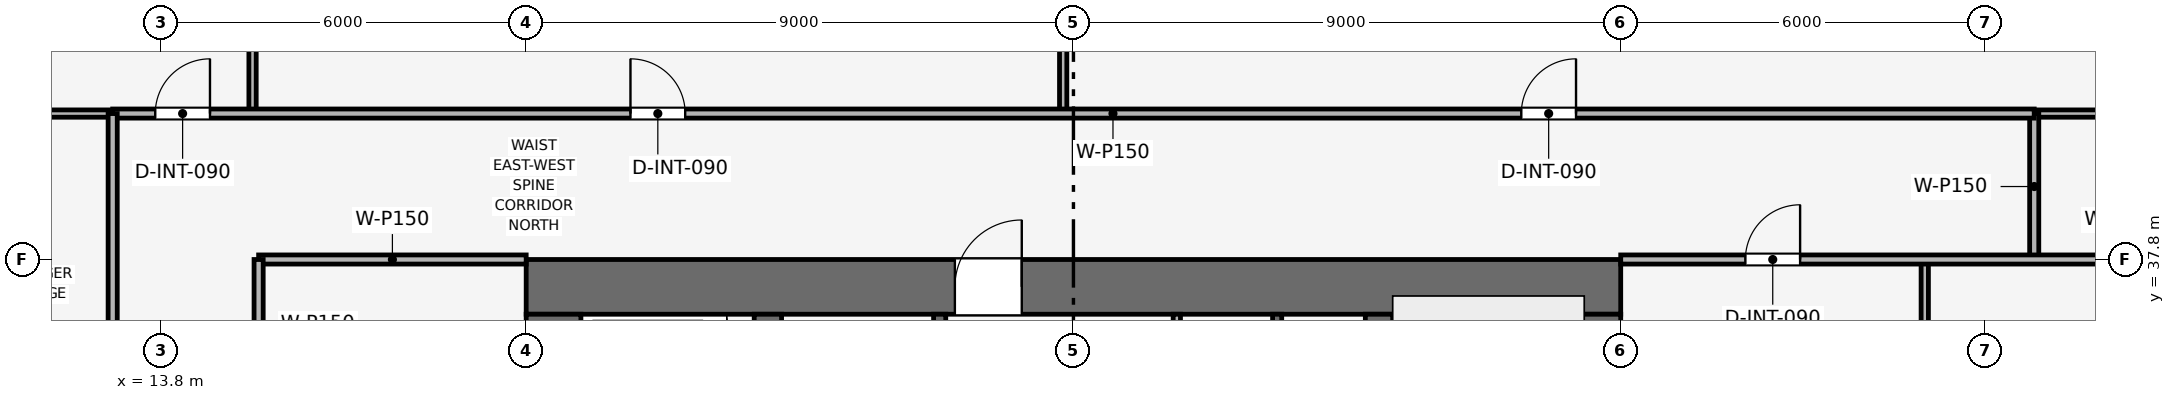
"""IFC4 building model, lengths in metres.
Left out: names, types, materials, properties, quantities, classifications, styles, units other than length and angle.
Written with IfcOpenShell. Run it as: python <this file> out.ifc"""

import sys

from ifc_helpers import new_model, si_unit, direction, frame, frame_2d, origin, place, context, subcontext, project, spatial, rectangle, extrude, element, fill, save


model = new_model("IFC4")
c1 = context("Model", 3, precision=1e-05, world=origin(), true_north=direction((0.0, 1.0)))
c2 = subcontext(c1, "Body", "Model", "MODEL_VIEW")
j1 = project(units=[si_unit("LENGTHUNIT", "METRE"), si_unit("PLANEANGLEUNIT", "RADIAN")], contexts=[c1])
p1 = place(None, origin())
s1 = spatial("IfcSite", under=j1, at=p1, CompositionType="ELEMENT")
p2 = place(p1, origin())
s2 = spatial("IfcBuilding", under=s1, at=p2, CompositionType="ELEMENT")
p3 = place(p2, frame((0.0, 0.0, 172.05)))
s3 = spatial("IfcBuildingStorey", under=s2, at=p3, CompositionType="ELEMENT", Elevation=172.05)
p4 = place(p3, frame((19.8, 37.35, 0.0), z_axis=(0.0, 0.0, 1.0), x_axis=(1.0, 0.0, 0.0)))
e1 = element("IfcWall", 1, at=p4, inside=s3, PredefinedType="SHEAR", context=c2, shape_type="SweptSolid", body=[
    extrude(rectangle(XDim=18.0, YDim=0.9, at=frame_2d((9.0, 0.0))), origin(), (0.0, 0.0, 1.0), 3.75),
])
p5 = place(p4, frame((7.05, 0.0, 0.0)))
e2 = element("IfcOpeningElement", 2, at=p5, cuts=e1, PredefinedType="OPENING", context=c2, shape_type="SweptSolid", body=[
    extrude(rectangle(XDim=1.1, YDim=2.15, at=frame_2d((0.55, 1.075))), frame((0.0, 0.46, 0.0), z_axis=(0.0, -1.0, 0.0), x_axis=(1.0, 0.0, 0.0)), (0.0, 0.0, 1.0), 0.92),
])
p6 = place(p3, frame((20.25, 20.7, 0.0), z_axis=(0.0, 0.0, 1.0), x_axis=(0.0, 1.0, 0.0)))
e3 = element("IfcWall", 3, at=p6, inside=s3, PredefinedType="SHEAR", context=c2, shape_type="SweptSolid", body=[
    extrude(rectangle(XDim=16.2, YDim=0.9, at=frame_2d((8.1, 0.0))), origin(), (0.0, 0.0, 1.0), 3.75),
])
p7 = place(p6, frame((10.1, 0.0, 0.0)))
e4 = element("IfcOpeningElement", 4, at=p7, cuts=e3, PredefinedType="OPENING", context=c2, shape_type="SweptSolid", body=[
    extrude(rectangle(XDim=1.1, YDim=2.15, at=frame_2d((0.55, 1.075))), frame((0.0, 0.46, 0.0), z_axis=(0.0, -1.0, 0.0), x_axis=(1.0, 0.0, 0.0)), (0.0, 0.0, 1.0), 0.92),
])
p8 = place(p3, frame((37.35, 20.7, 0.0), z_axis=(0.0, 0.0, 1.0), x_axis=(0.0, 1.0, 0.0)))
e5 = element("IfcWall", 5, at=p8, inside=s3, PredefinedType="SHEAR", context=c2, shape_type="SweptSolid", body=[
    extrude(rectangle(XDim=16.2, YDim=0.9, at=frame_2d((8.1, 0.0))), origin(), (0.0, 0.0, 1.0), 3.75),
])
p9 = place(p8, frame((4.6, 0.0, 0.0)))
e6 = element("IfcOpeningElement", 6, at=p9, cuts=e5, PredefinedType="OPENING", context=c2, shape_type="SweptSolid", body=[
    extrude(rectangle(XDim=1.1, YDim=2.15, at=frame_2d((0.55, 1.075))), frame((0.0, 0.46, 0.0), z_axis=(0.0, -1.0, 0.0), x_axis=(1.0, 0.0, 0.0)), (0.0, 0.0, 1.0), 0.92),
])
for number, where, z_axis, x_axis in (
    (7, (23.775, 20.7, 0.0), (0.0, 0.0, 1.0), (0.0, 1.0, 0.0)),
    (8, (33.825, 20.7, 0.0), (0.0, 0.0, 1.0), (0.0, 1.0, 0.0)),
):
    element("IfcWall", number, at=place(p3, frame(where, z_axis=z_axis, x_axis=x_axis)), inside=s3, PredefinedType="SHEAR", context=c2, shape_type="SweptSolid", body=[
        extrude(rectangle(XDim=16.2, YDim=0.45, at=frame_2d((8.1, 0.0))), origin(), (0.0, 0.0, 1.0), 3.75),
    ])
p10 = place(p3, frame((32.15, 34.0, 0.0), z_axis=(0.0, 0.0, 1.0), x_axis=(0.0, 1.0, 0.0)))
e9 = element("IfcWall", 9, at=p10, inside=s3, PredefinedType="SHEAR", context=c2, shape_type="SweptSolid", body=[
    extrude(rectangle(XDim=2.9, YDim=0.15, at=frame_2d((1.45, 0.0))), origin(), (0.0, 0.0, 1.0), 3.495),
])
p11 = place(p3, frame((26.6, 34.0, 0.0), z_axis=(0.0, 0.0, 1.0), x_axis=(0.0, 1.0, 0.0)))
e10 = element("IfcWall", 10, at=p11, inside=s3, PredefinedType="SHEAR", context=c2, shape_type="SweptSolid", body=[
    extrude(rectangle(XDim=2.9, YDim=0.2, at=frame_2d((1.45, 0.0))), origin(), (0.0, 0.0, 1.0), 3.495),
])
p12 = place(p11, frame((0.75, 0.0, 0.0)))
e11 = element("IfcOpeningElement", 11, at=p12, cuts=e10, PredefinedType="OPENING", context=c2, shape_type="SweptSolid", body=[
    extrude(rectangle(XDim=1.1, YDim=2.15, at=frame_2d((0.55, 1.075))), frame((0.0, 0.11, 0.0), z_axis=(0.0, -1.0, 0.0), x_axis=(1.0, 0.0, 0.0)), (0.0, 0.0, 1.0), 0.22),
])
p13 = place(p3, frame((30.5, 33.925, 0.0), z_axis=(0.0, 0.0, 1.0), x_axis=(0.0, 1.0, 0.0)))
e12 = element("IfcWall", 12, at=p13, inside=s3, PredefinedType="PARTITIONING", context=c2, shape_type="SweptSolid", body=[
    extrude(rectangle(XDim=2.975, YDim=0.12, at=frame_2d((1.487, 0.0))), origin(), (0.0, 0.0, 1.0), 3.495),
])
p14 = place(p13, frame((0.85, 0.0, 0.0)))
e13 = element("IfcOpeningElement", 13, at=p14, cuts=e12, PredefinedType="OPENING", context=c2, shape_type="SweptSolid", body=[
    extrude(rectangle(XDim=0.9, YDim=2.1, at=frame_2d((0.45, 1.05))), frame((0.0, 0.07, 0.0), z_axis=(0.0, -1.0, 0.0), x_axis=(1.0, 0.0, 0.0)), (0.0, 0.0, 1.0), 0.14),
])
p15 = place(p3, frame((15.4, 37.8, 0.0), z_axis=(0.0, 0.0, 1.0), x_axis=(1.0, 0.0, 0.0)))
e14 = element("IfcWall", 14, at=p15, inside=s3, PredefinedType="PARTITIONING", context=c2, shape_type="SweptSolid", body=[
    extrude(rectangle(XDim=4.4, YDim=0.15, at=frame_2d((2.2, 0.0))), origin(), (0.0, 0.0, 1.0), 3.03),
])
p16 = place(p3, frame((15.4, 32.45, 0.0), z_axis=(0.0, 0.0, 1.0), x_axis=(0.0, 1.0, 0.0)))
e15 = element("IfcWall", 15, at=p16, inside=s3, PredefinedType="PARTITIONING", context=c2, shape_type="SweptSolid", body=[
    extrude(rectangle(XDim=5.35, YDim=0.15, at=frame_2d((2.675, 0.0))), origin(), (0.0, 0.0, 1.0), 3.03),
])
p17 = place(p16, frame((2.1, 0.0, 0.0)))
e16 = element("IfcOpeningElement", 16, at=p17, cuts=e15, PredefinedType="OPENING", context=c2, shape_type="SweptSolid", body=[
    extrude(rectangle(XDim=0.9, YDim=2.1, at=frame_2d((0.45, 1.05))), frame((0.0, 0.085, 0.0), z_axis=(0.0, -1.0, 0.0), x_axis=(1.0, 0.0, 0.0)), (0.0, 0.0, 1.0), 0.17),
])
for number, where, z_axis, x_axis in (
    (17, (15.3, 40.2, 0.0), (0.0, 0.0, 1.0), (0.0, 1.0, 0.0)),
    (18, (28.631, 40.2, 0.0), (0.0, 0.0, 1.0), (0.0, 1.0, 0.0)),
):
    element("IfcWall", number, at=place(p3, frame(where, z_axis=z_axis, x_axis=x_axis)), inside=s3, PredefinedType="PARTITIONING", context=c2, shape_type="SweptSolid", body=[
        extrude(rectangle(XDim=12.77, YDim=0.12, at=frame_2d((6.385, 0.0))), origin(), (0.0, 0.0, 1.0), 2.98),
    ])
p18 = place(p3, frame((42.8, 26.85, 0.0), z_axis=(0.0, 0.0, 1.0), x_axis=(0.0, 1.0, 0.0)))
e19 = element("IfcWall", 19, at=p18, inside=s3, PredefinedType="PARTITIONING", context=c2, shape_type="SweptSolid", body=[
    extrude(rectangle(XDim=10.95, YDim=0.12, at=frame_2d((5.475, 0.0))), origin(), (0.0, 0.0, 1.0), 3.03),
])
p19 = place(p18, frame((5.025, 0.0, 0.0)))
e20 = element("IfcOpeningElement", 20, at=p19, cuts=e19, PredefinedType="OPENING", context=c2, shape_type="SweptSolid", body=[
    extrude(rectangle(XDim=0.9, YDim=2.1, at=frame_2d((0.45, 1.05))), frame((0.0, 0.07, 0.0), z_axis=(0.0, -1.0, 0.0), x_axis=(1.0, 0.0, 0.0)), (0.0, 0.0, 1.0), 0.14),
])
p20 = place(p3, frame((4.63, 40.2, 0.0), z_axis=(0.0, 0.0, 1.0), x_axis=(1.0, 0.0, 0.0)))
e21 = element("IfcWall", 21, at=p20, inside=s3, PredefinedType="PARTITIONING", context=c2, shape_type="SweptSolid", body=[
    extrude(rectangle(XDim=8.37, YDim=0.12, at=frame_2d((4.185, 0.0))), origin(), (0.0, 0.0, 1.0), 2.98),
])
p21 = place(p3, frame((44.6, 40.2, 0.0), z_axis=(0.0, 0.0, 1.0), x_axis=(1.0, 0.0, 0.0)))
e22 = element("IfcWall", 22, at=p21, inside=s3, PredefinedType="PARTITIONING", context=c2, shape_type="SweptSolid", body=[
    extrude(rectangle(XDim=8.37, YDim=0.12, at=frame_2d((4.185, 0.0))), origin(), (0.0, 0.0, 1.0), 2.98),
])
p22 = place(p3, frame((44.6, 37.8, 0.0), z_axis=(0.0, 0.0, 1.0), x_axis=(0.0, 1.0, 0.0)))
e23 = element("IfcWall", 23, at=p22, inside=s3, PredefinedType="PARTITIONING", context=c2, shape_type="SweptSolid", body=[
    extrude(rectangle(XDim=2.4, YDim=0.15, at=frame_2d((1.2, 0.0))), origin(), (0.0, 0.0, 1.0), 3.495),
])
p23 = place(p3, frame((37.8, 37.8, 0.0), z_axis=(0.0, 0.0, 1.0), x_axis=(1.0, 0.0, 0.0)))
e24 = element("IfcWall", 24, at=p23, inside=s3, PredefinedType="PARTITIONING", context=c2, shape_type="SweptSolid", body=[
    extrude(rectangle(XDim=15.17, YDim=0.15, at=frame_2d((7.585, 0.0))), origin(), (0.0, 0.0, 1.0), 2.98),
])
p24 = place(p23, frame((2.05, 0.0, 0.0)))
e25 = element("IfcOpeningElement", 25, at=p24, cuts=e24, PredefinedType="OPENING", context=c2, shape_type="SweptSolid", body=[
    extrude(rectangle(XDim=0.9, YDim=2.1, at=frame_2d((0.45, 1.05))), frame((0.0, 0.085, 0.0), z_axis=(0.0, -1.0, 0.0), x_axis=(1.0, 0.0, 0.0)), (0.0, 0.0, 1.0), 0.17),
])
p25 = place(p3, frame((13.0, 40.2, 0.0), z_axis=(0.0, 0.0, 1.0), x_axis=(1.0, 0.0, 0.0)))
e26 = element("IfcWall", 26, at=p25, inside=s3, PredefinedType="PARTITIONING", context=c2, shape_type="SweptSolid", body=[
    extrude(rectangle(XDim=31.6, YDim=0.15, at=frame_2d((15.8, 0.0))), origin(), (0.0, 0.0, 1.0), 3.03),
])
p26 = place(p25, frame((0.7, 0.0, 0.0)))
e27 = element("IfcOpeningElement", 27, at=p26, cuts=e26, PredefinedType="OPENING", context=c2, shape_type="SweptSolid", body=[
    extrude(rectangle(XDim=0.9, YDim=2.1, at=frame_2d((0.45, 1.05))), frame((0.0, 0.085, 0.0), z_axis=(0.0, -1.0, 0.0), x_axis=(1.0, 0.0, 0.0)), (0.0, 0.0, 1.0), 0.17),
])
p27 = place(p25, frame((8.515, 0.0, 0.0)))
e28 = element("IfcOpeningElement", 28, at=p27, cuts=e26, PredefinedType="OPENING", context=c2, shape_type="SweptSolid", body=[
    extrude(rectangle(XDim=0.9, YDim=2.1, at=frame_2d((0.45, 1.05))), frame((0.0, 0.085, 0.0), z_axis=(0.0, -1.0, 0.0), x_axis=(1.0, 0.0, 0.0)), (0.0, 0.0, 1.0), 0.17),
])
p28 = place(p25, frame((23.165, 0.0, 0.0)))
e29 = element("IfcOpeningElement", 29, at=p28, cuts=e26, PredefinedType="OPENING", context=c2, shape_type="SweptSolid", body=[
    extrude(rectangle(XDim=0.9, YDim=2.1, at=frame_2d((0.45, 1.05))), frame((0.0, 0.085, 0.0), z_axis=(0.0, -1.0, 0.0), x_axis=(1.0, 0.0, 0.0)), (0.0, 0.0, 1.0), 0.17),
])
p29 = place(p3, frame((13.0, 17.4, 0.0), z_axis=(0.0, 0.0, 1.0), x_axis=(0.0, 1.0, 0.0)))
e30 = element("IfcWall", 30, at=p29, inside=s3, PredefinedType="PARTITIONING", context=c2, shape_type="SweptSolid", body=[
    extrude(rectangle(XDim=22.8, YDim=0.15, at=frame_2d((11.4, 0.0))), origin(), (0.0, 0.0, 1.0), 3.03),
])
p30 = place(p29, frame((3.191, 0.0, 0.0)))
e31 = element("IfcOpeningElement", 31, at=p30, cuts=e30, PredefinedType="OPENING", context=c2, shape_type="SweptSolid", body=[
    extrude(rectangle(XDim=0.9, YDim=2.1, at=frame_2d((0.45, 1.05))), frame((0.0, 0.085, 0.0), z_axis=(0.0, -1.0, 0.0), x_axis=(1.0, 0.0, 0.0)), (0.0, 0.0, 1.0), 0.17),
])
p31 = place(p29, frame((6.581, 0.0, 0.0)))
e32 = element("IfcOpeningElement", 32, at=p31, cuts=e30, PredefinedType="OPENING", context=c2, shape_type="SweptSolid", body=[
    extrude(rectangle(XDim=0.9, YDim=2.1, at=frame_2d((0.45, 1.05))), frame((0.0, 0.085, 0.0), z_axis=(0.0, -1.0, 0.0), x_axis=(1.0, 0.0, 0.0)), (0.0, 0.0, 1.0), 0.17),
])
p32 = place(p29, frame((10.878, 0.0, 0.0)))
e33 = element("IfcOpeningElement", 33, at=p32, cuts=e30, PredefinedType="OPENING", context=c2, shape_type="SweptSolid", body=[
    extrude(rectangle(XDim=0.9, YDim=2.1, at=frame_2d((0.45, 1.05))), frame((0.0, 0.085, 0.0), z_axis=(0.0, -1.0, 0.0), x_axis=(1.0, 0.0, 0.0)), (0.0, 0.0, 1.0), 0.17),
])
p33 = place(p29, frame((16.488, 0.0, 0.0)))
e34 = element("IfcOpeningElement", 34, at=p33, cuts=e30, PredefinedType="OPENING", context=c2, shape_type="SweptSolid", body=[
    extrude(rectangle(XDim=0.9, YDim=2.1, at=frame_2d((0.45, 1.05))), frame((0.0, 0.085, 0.0), z_axis=(0.0, -1.0, 0.0), x_axis=(1.0, 0.0, 0.0)), (0.0, 0.0, 1.0), 0.17),
])
p34 = place(p24, origin())
e35 = element("IfcDoor", 35, at=p34, inside=s3, OperationType="SINGLE_SWING_RIGHT", PredefinedType="DOOR", context=c2, shape_type="SweptSolid", body=[
    extrude(rectangle(XDim=0.9, YDim=2.1, at=frame_2d((0.45, 1.05))), frame((0.0, 0.025, 0.0), z_axis=(0.0, -1.0, 0.0), x_axis=(1.0, 0.0, 0.0)), (0.0, 0.0, 1.0), 0.05),
])
fill(e25, e35)
p35 = place(p26, origin())
e36 = element("IfcDoor", 36, at=p35, inside=s3, OperationType="SINGLE_SWING_RIGHT", PredefinedType="DOOR", context=c2, shape_type="SweptSolid", body=[
    extrude(rectangle(XDim=0.9, YDim=2.1, at=frame_2d((0.45, 1.05))), frame((0.0, 0.025, 0.0), z_axis=(0.0, -1.0, 0.0), x_axis=(1.0, 0.0, 0.0)), (0.0, 0.0, 1.0), 0.05),
])
fill(e27, e36)
p36 = place(p27, origin())
e37 = element("IfcDoor", 37, at=p36, inside=s3, OperationType="SINGLE_SWING_LEFT", PredefinedType="DOOR", context=c2, shape_type="SweptSolid", body=[
    extrude(rectangle(XDim=0.9, YDim=2.1, at=frame_2d((0.45, 1.05))), frame((0.0, 0.025, 0.0), z_axis=(0.0, -1.0, 0.0), x_axis=(1.0, 0.0, 0.0)), (0.0, 0.0, 1.0), 0.05),
])
fill(e28, e37)
p37 = place(p28, origin())
e38 = element("IfcDoor", 38, at=p37, inside=s3, OperationType="SINGLE_SWING_RIGHT", PredefinedType="DOOR", context=c2, shape_type="SweptSolid", body=[
    extrude(rectangle(XDim=0.9, YDim=2.1, at=frame_2d((0.45, 1.05))), frame((0.0, 0.025, 0.0), z_axis=(0.0, -1.0, 0.0), x_axis=(1.0, 0.0, 0.0)), (0.0, 0.0, 1.0), 0.05),
])
fill(e29, e38)
p38 = place(p5, origin())
e39 = element("IfcDoor", 39, at=p38, inside=s3, OperationType="SINGLE_SWING_RIGHT", PredefinedType="DOOR", context=c2, shape_type="SweptSolid", body=[
    extrude(rectangle(XDim=1.1, YDim=2.15, at=frame_2d((0.55, 1.075))), frame((0.0, 0.025, 0.0), z_axis=(0.0, -1.0, 0.0), x_axis=(1.0, 0.0, 0.0)), (0.0, 0.0, 1.0), 0.05),
])
fill(e2, e39)
save(model, sys.argv[1])
